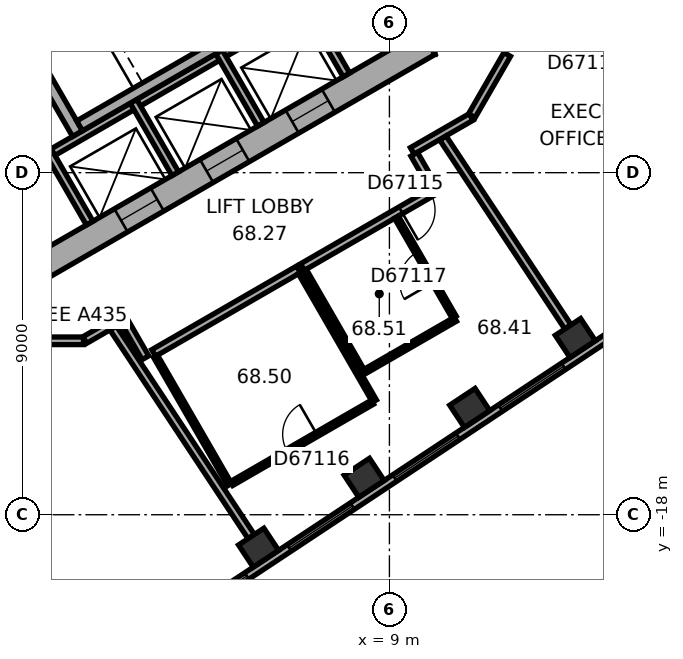
"""IFC4 building model, lengths in metres.
Left out: names, types, materials, properties, quantities, classifications, styles, units other than length and angle.
Written with IfcOpenShell. Run it as: python <this file> out.ifc"""

import sys

from ifc_helpers import new_model, si_unit, direction, frame, frame_2d, origin, origin_2d, place, context, subcontext, project, spatial, rectangle, extrude, element, fill, save


model = new_model("IFC4")
c1 = context("Model", 3, precision=1e-05, world=origin(), true_north=direction((0.0, 1.0)))
c2 = subcontext(c1, "Body", "Model", "MODEL_VIEW")
j1 = project(units=[si_unit("LENGTHUNIT", "METRE"), si_unit("PLANEANGLEUNIT", "RADIAN")], contexts=[c1])
p1 = place(None, origin())
s1 = spatial("IfcSite", under=j1, at=p1, CompositionType="ELEMENT")
p2 = place(p1, origin())
s2 = spatial("IfcBuilding", under=s1, at=p2, CompositionType="ELEMENT")
p3 = place(p2, frame((0.0, 0.0, 274.6)))
s3 = spatial("IfcBuildingStorey", under=s2, at=p3, CompositionType="ELEMENT", Elevation=274.6)
for number, where, z_axis, x_axis in (
    (1, (5.557, -18.867, 0.0), (0.0, 0.0, 1.0), (0.834, 0.552, 0.0)),
    (2, (8.335, -17.028, 0.0), (0.0, 0.0, 1.0), (0.834, 0.552, 0.0)),
    (3, (11.113, -15.189, 0.0), (0.0, 0.0, 1.0), (0.834, 0.552, 0.0)),
    (4, (13.891, -13.351, 0.0), (0.0, 0.0, 1.0), (0.834, 0.552, 0.0)),
):
    element("IfcColumn", number, at=place(p3, frame(where, z_axis=z_axis, x_axis=x_axis)), inside=s3, PredefinedType="COLUMN", context=c2, shape_type="SweptSolid", body=[
        extrude(rectangle(XDim=0.8, YDim=0.7, at=origin_2d()), origin(), (0.0, 0.0, 1.0), 3.7),
    ])
p4 = place(p3, frame((9.85, -5.889, 0.0), z_axis=(0.0, 0.0, 1.0), x_axis=(0.0, 1.0, 0.0)))
e5 = element("IfcWall", 5, at=p4, inside=s3, PredefinedType="SHEAR", context=c2, shape_type="SweptSolid", body=[
    extrude(rectangle(XDim=11.778, YDim=0.7, at=frame_2d((5.889, 0.0))), origin(), (0.0, 0.0, 1.0), 3.7),
])
p5 = place(p4, frame((6.089, 0.0, 0.0)))
e6 = element("IfcOpeningElement", 6, at=p5, cuts=e5, PredefinedType="OPENING", context=c2, shape_type="SweptSolid", body=[
    extrude(rectangle(XDim=1.5, YDim=2.1, at=frame_2d((0.75, 1.05))), frame((0.0, 0.36, 0.0), z_axis=(0.0, -1.0, 0.0), x_axis=(1.0, 0.0, 0.0)), (0.0, 0.0, 1.0), 0.72),
])
p6 = place(p4, frame((1.639, 0.0, 0.0)))
e7 = element("IfcOpeningElement", 7, at=p6, cuts=e5, PredefinedType="OPENING", context=c2, shape_type="SweptSolid", body=[
    extrude(rectangle(XDim=0.9, YDim=2.1, at=frame_2d((0.45, 1.05))), frame((0.0, 0.36, 0.0), z_axis=(0.0, -1.0, 0.0), x_axis=(1.0, 0.0, 0.0)), (0.0, 0.0, 1.0), 0.72),
])
p7 = place(p4, frame((4.239, 0.0, 0.0)))
e8 = element("IfcOpeningElement", 8, at=p7, cuts=e5, PredefinedType="OPENING", context=c2, shape_type="SweptSolid", body=[
    extrude(rectangle(XDim=0.9, YDim=2.1, at=frame_2d((0.45, 1.05))), frame((0.0, 0.36, 0.0), z_axis=(0.0, -1.0, 0.0), x_axis=(1.0, 0.0, 0.0)), (0.0, 0.0, 1.0), 0.72),
])
p8 = place(p3, frame((-10.025, -5.586, 0.0), z_axis=(0.0, 0.0, 1.0), x_axis=(0.866026453023, -0.499998182661, 0.0)))
e9 = element("IfcWall", 9, at=p8, inside=s3, PredefinedType="SHEAR", context=c2, shape_type="SweptSolid", body=[
    extrude(rectangle(XDim=11.778, YDim=0.7, at=frame_2d((5.889, 0.0))), origin(), (0.0, 0.0, 1.0), 3.7),
])
p9 = place(p8, frame((6.089, 0.0, 0.0)))
e10 = element("IfcOpeningElement", 10, at=p9, cuts=e9, PredefinedType="OPENING", context=c2, shape_type="SweptSolid", body=[
    extrude(rectangle(XDim=1.5, YDim=2.1, at=frame_2d((0.75, 1.05))), frame((0.0, 0.36, 0.0), z_axis=(0.0, -1.0, 0.0), x_axis=(1.0, 0.0, 0.0)), (0.0, 0.0, 1.0), 0.72),
])
p10 = place(p8, frame((1.539, 0.0, 0.0)))
e11 = element("IfcOpeningElement", 11, at=p10, cuts=e9, PredefinedType="OPENING", context=c2, shape_type="SweptSolid", body=[
    extrude(rectangle(XDim=1.1, YDim=2.1, at=frame_2d((0.55, 1.05))), frame((0.0, 0.36, 0.0), z_axis=(0.0, -1.0, 0.0), x_axis=(1.0, 0.0, 0.0)), (0.0, 0.0, 1.0), 0.72),
])
p11 = place(p8, frame((4.139, 0.0, 0.0)))
e12 = element("IfcOpeningElement", 12, at=p11, cuts=e9, PredefinedType="OPENING", context=c2, shape_type="SweptSolid", body=[
    extrude(rectangle(XDim=1.1, YDim=2.1, at=frame_2d((0.55, 1.05))), frame((0.0, 0.36, 0.0), z_axis=(0.0, -1.0, 0.0), x_axis=(1.0, 0.0, 0.0)), (0.0, 0.0, 1.0), 0.72),
])
p12 = place(p3, frame((-0.175, -11.475, 0.0), z_axis=(0.0, 0.0, 1.0), x_axis=(0.866026453023, 0.499998182661, 0.0)))
e13 = element("IfcWall", 13, at=p12, inside=s3, PredefinedType="SHEAR", context=c2, shape_type="SweptSolid", body=[
    extrude(rectangle(XDim=11.778, YDim=0.7, at=frame_2d((5.889, 0.0))), origin(), (0.0, 0.0, 1.0), 3.7),
])
p13 = place(p12, frame((2.439, 0.0, 0.0)))
e14 = element("IfcOpeningElement", 14, at=p13, cuts=e13, PredefinedType="OPENING", context=c2, shape_type="SweptSolid", body=[
    extrude(rectangle(XDim=1.1, YDim=2.1, at=frame_2d((0.55, 1.05))), frame((0.0, 0.36, 0.0), z_axis=(0.0, -1.0, 0.0), x_axis=(1.0, 0.0, 0.0)), (0.0, 0.0, 1.0), 0.72),
])
p14 = place(p12, frame((5.039, 0.0, 0.0)))
e15 = element("IfcOpeningElement", 15, at=p14, cuts=e13, PredefinedType="OPENING", context=c2, shape_type="SweptSolid", body=[
    extrude(rectangle(XDim=1.1, YDim=2.1, at=frame_2d((0.55, 1.05))), frame((0.0, 0.36, 0.0), z_axis=(0.0, -1.0, 0.0), x_axis=(1.0, 0.0, 0.0)), (0.0, 0.0, 1.0), 0.72),
])
p15 = place(p12, frame((7.639, 0.0, 0.0)))
e16 = element("IfcOpeningElement", 16, at=p15, cuts=e13, PredefinedType="OPENING", context=c2, shape_type="SweptSolid", body=[
    extrude(rectangle(XDim=1.1, YDim=2.1, at=frame_2d((0.55, 1.05))), frame((0.0, 0.36, 0.0), z_axis=(0.0, -1.0, 0.0), x_axis=(1.0, 0.0, 0.0)), (0.0, 0.0, 1.0), 0.72),
])
p16 = place(p3, frame((2.58, -21.377, 0.0), z_axis=(0.0, 0.0, 1.0), x_axis=(0.833888592176, 0.551932800112, 0.0)))
e17 = element("IfcWall", 17, at=p16, inside=s3, PredefinedType="STANDARD", context=c2, shape_type="SweptSolid", body=[
    extrude(rectangle(XDim=17.731, YDim=0.2, at=frame_2d((8.866, 0.0))), origin(), (0.0, 0.0, 1.0), 3.7),
])
p17 = place(p16, frame((1.202, 0.0, 0.9)))
e18 = element("IfcOpeningElement", 18, at=p17, cuts=e17, PredefinedType="OPENING", context=c2, shape_type="SweptSolid", body=[
    extrude(rectangle(XDim=2.0, YDim=2.0, at=frame_2d((1.0, 1.0))), frame((0.0, 0.11, 0.0), z_axis=(0.0, -1.0, 0.0), x_axis=(1.0, 0.0, 0.0)), (0.0, 0.0, 1.0), 0.22),
])
p18 = place(p16, frame((4.533, 0.0, 0.9)))
e19 = element("IfcOpeningElement", 19, at=p18, cuts=e17, PredefinedType="OPENING", context=c2, shape_type="SweptSolid", body=[
    extrude(rectangle(XDim=2.0, YDim=2.0, at=frame_2d((1.0, 1.0))), frame((0.0, 0.11, 0.0), z_axis=(0.0, -1.0, 0.0), x_axis=(1.0, 0.0, 0.0)), (0.0, 0.0, 1.0), 0.22),
])
p19 = place(p16, frame((7.865, 0.0, 0.9)))
e20 = element("IfcOpeningElement", 20, at=p19, cuts=e17, PredefinedType="OPENING", context=c2, shape_type="SweptSolid", body=[
    extrude(rectangle(XDim=2.0, YDim=2.0, at=frame_2d((1.0, 1.0))), frame((0.0, 0.11, 0.0), z_axis=(0.0, -1.0, 0.0), x_axis=(1.0, 0.0, 0.0)), (0.0, 0.0, 1.0), 0.22),
])
p20 = place(p16, frame((11.197, 0.0, 0.9)))
e21 = element("IfcOpeningElement", 21, at=p20, cuts=e17, PredefinedType="OPENING", context=c2, shape_type="SweptSolid", body=[
    extrude(rectangle(XDim=2.0, YDim=2.0, at=frame_2d((1.0, 1.0))), frame((0.0, 0.11, 0.0), z_axis=(0.0, -1.0, 0.0), x_axis=(1.0, 0.0, 0.0)), (0.0, 0.0, 1.0), 0.22),
])
p21 = place(p16, frame((14.528, 0.0, 0.9)))
e22 = element("IfcOpeningElement", 22, at=p21, cuts=e17, PredefinedType="OPENING", context=c2, shape_type="SweptSolid", body=[
    extrude(rectangle(XDim=2.0, YDim=2.0, at=frame_2d((1.0, 1.0))), frame((0.0, 0.11, 0.0), z_axis=(0.0, -1.0, 0.0), x_axis=(1.0, 0.0, 0.0)), (0.0, 0.0, 1.0), 0.22),
])
p22 = place(p3, frame((-0.024, -8.559, 0.0), z_axis=(0.0, 0.0, 1.0), x_axis=(0.866026010844, 0.49999894854, 0.0)))
e23 = element("IfcWall", 23, at=p22, inside=s3, PredefinedType="PARTITIONING", context=c2, shape_type="SweptSolid", body=[
    extrude(rectangle(XDim=8.0, YDim=0.2, at=frame_2d((4.0, 0.0))), origin(), (0.0, 0.0, 1.0), 3.35),
])
for number, where, z_axis, x_axis in (
    (24, (0.013, -8.422, 0.0), (0.0, 0.0, 1.0), (0.5, -0.866, 0.0)),
    (25, (2.264, -7.122, 0.0), (0.0, 0.0, 1.0), (0.5, -0.866, 0.0)),
    (26, (4.516, -5.822, 0.0), (0.0, 0.0, 1.0), (0.5, -0.866, 0.0)),
    (27, (6.768, -4.522, 0.0), (0.0, 0.0, 1.0), (0.5, -0.866, 0.0)),
):
    element("IfcWall", number, at=place(p3, frame(where, z_axis=z_axis, x_axis=x_axis)), inside=s3, PredefinedType="PARTITIONING", context=c2, shape_type="SweptSolid", body=[
        extrude(rectangle(XDim=2.2, YDim=0.2, at=frame_2d((1.1, 0.0))), origin(), (0.0, 0.0, 1.0), 3.35),
    ])
p23 = place(p3, frame((-1.558, -3.902, 0.0), z_axis=(0.0, 0.0, 1.0), x_axis=(0.499977259774, -0.866038532462, 0.0)))
e28 = element("IfcWall", 28, at=p23, inside=s3, PredefinedType="SHEAR", context=c2, shape_type="SweptSolid", body=[
    extrude(rectangle(XDim=4.7, YDim=0.3, at=frame_2d((2.35, 0.0))), origin(), (0.0, 0.0, 1.0), 3.35),
])
p24 = place(p23, frame((0.8, 0.0, 0.0)))
e29 = element("IfcOpeningElement", 29, at=p24, cuts=e28, PredefinedType="OPENING", context=c2, shape_type="SweptSolid", body=[
    extrude(rectangle(XDim=1.2, YDim=2.1, at=frame_2d((0.6, 1.05))), frame((0.0, 0.16, 0.0), z_axis=(0.0, -1.0, 0.0), x_axis=(1.0, 0.0, 0.0)), (0.0, 0.0, 1.0), 0.32),
])
p25 = place(p3, frame((0.847, -7.767, 0.0), z_axis=(0.0, 0.0, 1.0), x_axis=(0.866027801685, 0.499995846692, 0.0)))
e30 = element("IfcWall", 30, at=p25, inside=s3, PredefinedType="SHEAR", context=c2, shape_type="SweptSolid", body=[
    extrude(rectangle(XDim=7.06, YDim=0.3, at=frame_2d((3.53, 0.0))), origin(), (0.0, 0.0, 1.0), 3.35),
])
p26 = place(p3, frame((-0.91, -13.423, 0.0), z_axis=(0.0, 0.0, 1.0), x_axis=(1.0, 0.0, 0.0)))
e31 = element("IfcWall", 31, at=p26, inside=s3, PredefinedType="PARTITIONING", context=c2, shape_type="SweptSolid", body=[
    extrude(rectangle(XDim=1.86, YDim=0.2, at=frame_2d((0.93, 0.0))), origin(), (0.0, 0.0, 1.0), 3.35),
])
p27 = place(p3, frame((0.985, -13.403, 0.0), z_axis=(0.0, 0.0, 1.0), x_axis=(0.866032814021, 0.499987164874, 0.0)))
e32 = element("IfcWall", 32, at=p27, inside=s3, PredefinedType="PARTITIONING", context=c2, shape_type="SweptSolid", body=[
    extrude(rectangle(XDim=0.798, YDim=0.2, at=frame_2d((0.399, 0.0))), origin(), (0.0, 0.0, 1.0), 3.35),
])
p28 = place(p3, frame((1.979, -12.829, 0.0), z_axis=(0.0, 0.0, 1.0), x_axis=(0.500074377092, -0.865982457891, 0.0)))
e33 = element("IfcWall", 33, at=p28, inside=s3, PredefinedType="PARTITIONING", context=c2, shape_type="SweptSolid", body=[
    extrude(rectangle(XDim=1.201, YDim=0.2, at=frame_2d((0.601, 0.0))), origin(), (0.0, 0.0, 1.0), 3.35),
])
p29 = place(p3, frame((2.796, -13.744, 0.0), z_axis=(0.0, 0.0, 1.0), x_axis=(0.866018331238, 0.50001224981, 0.0)))
e34 = element("IfcWall", 34, at=p29, inside=s3, PredefinedType="PARTITIONING", context=c2, shape_type="SweptSolid", body=[
    extrude(rectangle(XDim=4.4, YDim=0.2, at=frame_2d((2.2, 0.0))), origin(), (0.0, 0.0, 1.0), 3.35),
])
p30 = place(p3, frame((4.796, -17.208, 0.0), z_axis=(0.0, 0.0, 1.0), x_axis=(-0.500043961785, 0.866000020948, 0.0)))
e35 = element("IfcWall", 35, at=p30, inside=s3, PredefinedType="PARTITIONING", context=c2, shape_type="SweptSolid", body=[
    extrude(rectangle(XDim=3.9, YDim=0.12, at=frame_2d((1.95, 0.0))), origin(), (0.0, 0.0, 1.0), 3.35),
])
p31 = place(p3, frame((5.364, -18.575, 0.0), z_axis=(0.0, 0.0, 1.0), x_axis=(-0.55195757761, 0.833872191957, 0.0)))
e36 = element("IfcWall", 36, at=p31, inside=s3, PredefinedType="PARTITIONING", context=c2, shape_type="SweptSolid", body=[
    extrude(rectangle(XDim=6.581, YDim=0.2, at=frame_2d((3.291, 0.0))), origin(), (0.0, 0.0, 1.0), 3.35),
])
p32 = place(p3, frame((6.656, -11.631, 0.0), z_axis=(0.0, 0.0, 1.0), x_axis=(0.499997012787, -0.866027128446, 0.0)))
e37 = element("IfcWall", 37, at=p32, inside=s3, PredefinedType="PARTITIONING", context=c2, shape_type="SweptSolid", body=[
    extrude(rectangle(XDim=3.9, YDim=0.12, at=frame_2d((1.95, 0.0))), origin(), (0.0, 0.0, 1.0), 3.35),
])
p33 = place(p3, frame((6.71, -11.485, 0.0), z_axis=(0.0, 0.0, 1.0), x_axis=(0.866021232452, 0.500007224889, 0.0)))
e38 = element("IfcWall", 38, at=p33, inside=s3, PredefinedType="PARTITIONING", context=c2, shape_type="SweptSolid", body=[
    extrude(rectangle(XDim=4.032, YDim=0.2, at=frame_2d((2.016, 0.0))), origin(), (0.0, 0.0, 1.0), 3.35),
])
p34 = place(p33, frame((2.991, 0.0, 0.0)))
e39 = element("IfcOpeningElement", 39, at=p34, cuts=e38, PredefinedType="OPENING", context=c2, shape_type="SweptSolid", body=[
    extrude(rectangle(XDim=0.9, YDim=2.1, at=frame_2d((0.45, 1.05))), frame((0.0, 0.11, 0.0), z_axis=(0.0, -1.0, 0.0), x_axis=(1.0, 0.0, 0.0)), (0.0, 0.0, 1.0), 0.22),
])
p35 = place(p3, frame((8.31, -14.256, 0.0), z_axis=(0.0, 0.0, 1.0), x_axis=(-0.49999285859, 0.86602952684, 0.0)))
e40 = element("IfcWall", 40, at=p35, inside=s3, PredefinedType="PARTITIONING", context=c2, shape_type="SweptSolid", body=[
    extrude(rectangle(XDim=3.1, YDim=0.12, at=frame_2d((1.55, 0.0))), origin(), (0.0, 0.0, 1.0), 3.35),
])
p36 = place(p3, frame((8.554, -15.039, 0.0), z_axis=(0.0, 0.0, 1.0), x_axis=(-0.865994635417, -0.500053288589, 0.0)))
e41 = element("IfcWall", 41, at=p36, inside=s3, PredefinedType="PARTITIONING", context=c2, shape_type="SweptSolid", body=[
    extrude(rectangle(XDim=4.28, YDim=0.12, at=frame_2d((2.14, 0.0))), origin(), (0.0, 0.0, 1.0), 3.35),
])
p37 = place(p36, frame((1.69, 0.0, 0.0)))
e42 = element("IfcOpeningElement", 42, at=p37, cuts=e41, PredefinedType="OPENING", context=c2, shape_type="SweptSolid", body=[
    extrude(rectangle(XDim=0.9, YDim=2.1, at=frame_2d((0.45, 1.05))), frame((0.0, 0.07, 0.0), z_axis=(0.0, -1.0, 0.0), x_axis=(1.0, 0.0, 0.0)), (0.0, 0.0, 1.0), 0.14),
])
p38 = place(p3, frame((9.602, -8.428, 0.0), z_axis=(0.0, 0.0, 1.0), x_axis=(0.865999114786, 0.500045531117, 0.0)))
e43 = element("IfcWall", 43, at=p38, inside=s3, PredefinedType="PARTITIONING", context=c2, shape_type="SweptSolid", body=[
    extrude(rectangle(XDim=1.788, YDim=0.2, at=frame_2d((0.894, 0.0))), origin(), (0.0, 0.0, 1.0), 3.35),
])
p39 = place(p3, frame((10.152, -9.382, 0.0), z_axis=(0.0, 0.0, 1.0), x_axis=(-0.499968756647, 0.866043441391, 0.0)))
e44 = element("IfcWall", 44, at=p39, inside=s3, PredefinedType="PARTITIONING", context=c2, shape_type="SweptSolid", body=[
    extrude(rectangle(XDim=1.001, YDim=0.2, at=frame_2d((0.5, 0.0))), origin(), (0.0, 0.0, 1.0), 3.35),
])
p40 = place(p3, frame((10.705, -12.804, 0.0), z_axis=(0.0, 0.0, 1.0), x_axis=(-0.500026023896, 0.86601037836, 0.0)))
e45 = element("IfcWall", 45, at=p40, inside=s3, PredefinedType="PARTITIONING", context=c2, shape_type="SweptSolid", body=[
    extrude(rectangle(XDim=3.04, YDim=0.12, at=frame_2d((1.52, 0.0))), origin(), (0.0, 0.0, 1.0), 3.35),
])
p41 = place(p40, frame((1.07, 0.0, 0.0)))
e46 = element("IfcOpeningElement", 46, at=p41, cuts=e45, PredefinedType="OPENING", context=c2, shape_type="SweptSolid", body=[
    extrude(rectangle(XDim=0.9, YDim=2.1, at=frame_2d((0.45, 1.05))), frame((0.0, 0.07, 0.0), z_axis=(0.0, -1.0, 0.0), x_axis=(1.0, 0.0, 0.0)), (0.0, 0.0, 1.0), 0.14),
])
p42 = place(p3, frame((10.735, -12.856, 0.0), z_axis=(0.0, 0.0, 1.0), x_axis=(-0.865997131366, -0.500048966069, 0.0)))
e47 = element("IfcWall", 47, at=p42, inside=s3, PredefinedType="PARTITIONING", context=c2, shape_type="SweptSolid", body=[
    extrude(rectangle(XDim=2.74, YDim=0.12, at=frame_2d((1.37, 0.0))), origin(), (0.0, 0.0, 1.0), 3.35),
])
p43 = place(p3, frame((11.17, -7.5, 0.0), z_axis=(0.0, 0.0, 1.0), x_axis=(0.500006454166, 0.866021677438, 0.0)))
e48 = element("IfcWall", 48, at=p43, inside=s3, PredefinedType="PARTITIONING", context=c2, shape_type="SweptSolid", body=[
    extrude(rectangle(XDim=1.86, YDim=0.2, at=frame_2d((0.93, 0.0))), origin(), (0.0, 0.0, 1.0), 3.35),
])
p44 = place(p3, frame((13.698, -13.059, 0.0), z_axis=(0.0, 0.0, 1.0), x_axis=(-0.551927229301, 0.833892279348, 0.0)))
e49 = element("IfcWall", 49, at=p44, inside=s3, PredefinedType="PARTITIONING", context=c2, shape_type="SweptSolid", body=[
    extrude(rectangle(XDim=5.96, YDim=0.2, at=frame_2d((2.98, 0.0))), origin(), (0.0, 0.0, 1.0), 2.65),
])
p45 = place(p17, origin())
e50 = element("IfcWindow", 50, at=p45, inside=s3, PartitioningType="SINGLE_PANEL", PredefinedType="WINDOW", context=c2, shape_type="SweptSolid", body=[
    extrude(rectangle(XDim=2.0, YDim=2.0, at=frame_2d((1.0, 1.0))), frame((0.0, 0.03, 0.0), z_axis=(0.0, -1.0, 0.0), x_axis=(1.0, 0.0, 0.0)), (0.0, 0.0, 1.0), 0.06),
])
fill(e18, e50)
p46 = place(p18, origin())
e51 = element("IfcWindow", 51, at=p46, inside=s3, PartitioningType="SINGLE_PANEL", PredefinedType="WINDOW", context=c2, shape_type="SweptSolid", body=[
    extrude(rectangle(XDim=2.0, YDim=2.0, at=frame_2d((1.0, 1.0))), frame((0.0, 0.03, 0.0), z_axis=(0.0, -1.0, 0.0), x_axis=(1.0, 0.0, 0.0)), (0.0, 0.0, 1.0), 0.06),
])
fill(e19, e51)
p47 = place(p19, origin())
e52 = element("IfcWindow", 52, at=p47, inside=s3, PartitioningType="SINGLE_PANEL", PredefinedType="WINDOW", context=c2, shape_type="SweptSolid", body=[
    extrude(rectangle(XDim=2.0, YDim=2.0, at=frame_2d((1.0, 1.0))), frame((0.0, 0.03, 0.0), z_axis=(0.0, -1.0, 0.0), x_axis=(1.0, 0.0, 0.0)), (0.0, 0.0, 1.0), 0.06),
])
fill(e20, e52)
p48 = place(p20, origin())
e53 = element("IfcWindow", 53, at=p48, inside=s3, PartitioningType="SINGLE_PANEL", PredefinedType="WINDOW", context=c2, shape_type="SweptSolid", body=[
    extrude(rectangle(XDim=2.0, YDim=2.0, at=frame_2d((1.0, 1.0))), frame((0.0, 0.03, 0.0), z_axis=(0.0, -1.0, 0.0), x_axis=(1.0, 0.0, 0.0)), (0.0, 0.0, 1.0), 0.06),
])
fill(e21, e53)
p49 = place(p13, origin())
e54 = element("IfcDoor", 54, at=p49, inside=s3, OperationType="DOUBLE_DOOR_SLIDING", PredefinedType="DOOR", context=c2, shape_type="SweptSolid", body=[
    extrude(rectangle(XDim=1.1, YDim=2.1, at=frame_2d((0.55, 1.05))), frame((0.0, 0.025, 0.0), z_axis=(0.0, -1.0, 0.0), x_axis=(1.0, 0.0, 0.0)), (0.0, 0.0, 1.0), 0.05),
])
fill(e14, e54)
p50 = place(p14, origin())
e55 = element("IfcDoor", 55, at=p50, inside=s3, OperationType="DOUBLE_DOOR_SLIDING", PredefinedType="DOOR", context=c2, shape_type="SweptSolid", body=[
    extrude(rectangle(XDim=1.1, YDim=2.1, at=frame_2d((0.55, 1.05))), frame((0.0, 0.025, 0.0), z_axis=(0.0, -1.0, 0.0), x_axis=(1.0, 0.0, 0.0)), (0.0, 0.0, 1.0), 0.05),
])
fill(e15, e55)
p51 = place(p15, origin())
e56 = element("IfcDoor", 56, at=p51, inside=s3, OperationType="DOUBLE_DOOR_SLIDING", PredefinedType="DOOR", context=c2, shape_type="SweptSolid", body=[
    extrude(rectangle(XDim=1.1, YDim=2.1, at=frame_2d((0.55, 1.05))), frame((0.0, 0.025, 0.0), z_axis=(0.0, -1.0, 0.0), x_axis=(1.0, 0.0, 0.0)), (0.0, 0.0, 1.0), 0.05),
])
fill(e16, e56)
p52 = place(p34, origin())
e57 = element("IfcDoor", 57, at=p52, inside=s3, OperationType="SINGLE_SWING_LEFT", PredefinedType="DOOR", context=c2, shape_type="SweptSolid", body=[
    extrude(rectangle(XDim=0.9, YDim=2.1, at=frame_2d((0.45, 1.05))), frame((0.0, 0.025, 0.0), z_axis=(0.0, -1.0, 0.0), x_axis=(1.0, 0.0, 0.0)), (0.0, 0.0, 1.0), 0.05),
])
fill(e39, e57)
p53 = place(p37, origin())
e58 = element("IfcDoor", 58, at=p53, inside=s3, OperationType="SINGLE_SWING_LEFT", PredefinedType="DOOR", context=c2, shape_type="SweptSolid", body=[
    extrude(rectangle(XDim=0.9, YDim=2.1, at=frame_2d((0.45, 1.05))), frame((0.0, 0.025, 0.0), z_axis=(0.0, -1.0, 0.0), x_axis=(1.0, 0.0, 0.0)), (0.0, 0.0, 1.0), 0.05),
])
fill(e42, e58)
p54 = place(p41, origin())
e59 = element("IfcDoor", 59, at=p54, inside=s3, OperationType="SINGLE_SWING_LEFT", PredefinedType="DOOR", context=c2, shape_type="SweptSolid", body=[
    extrude(rectangle(XDim=0.9, YDim=2.1, at=frame_2d((0.45, 1.05))), frame((0.0, 0.025, 0.0), z_axis=(0.0, -1.0, 0.0), x_axis=(1.0, 0.0, 0.0)), (0.0, 0.0, 1.0), 0.05),
])
fill(e46, e59)
save(model, sys.argv[1])
